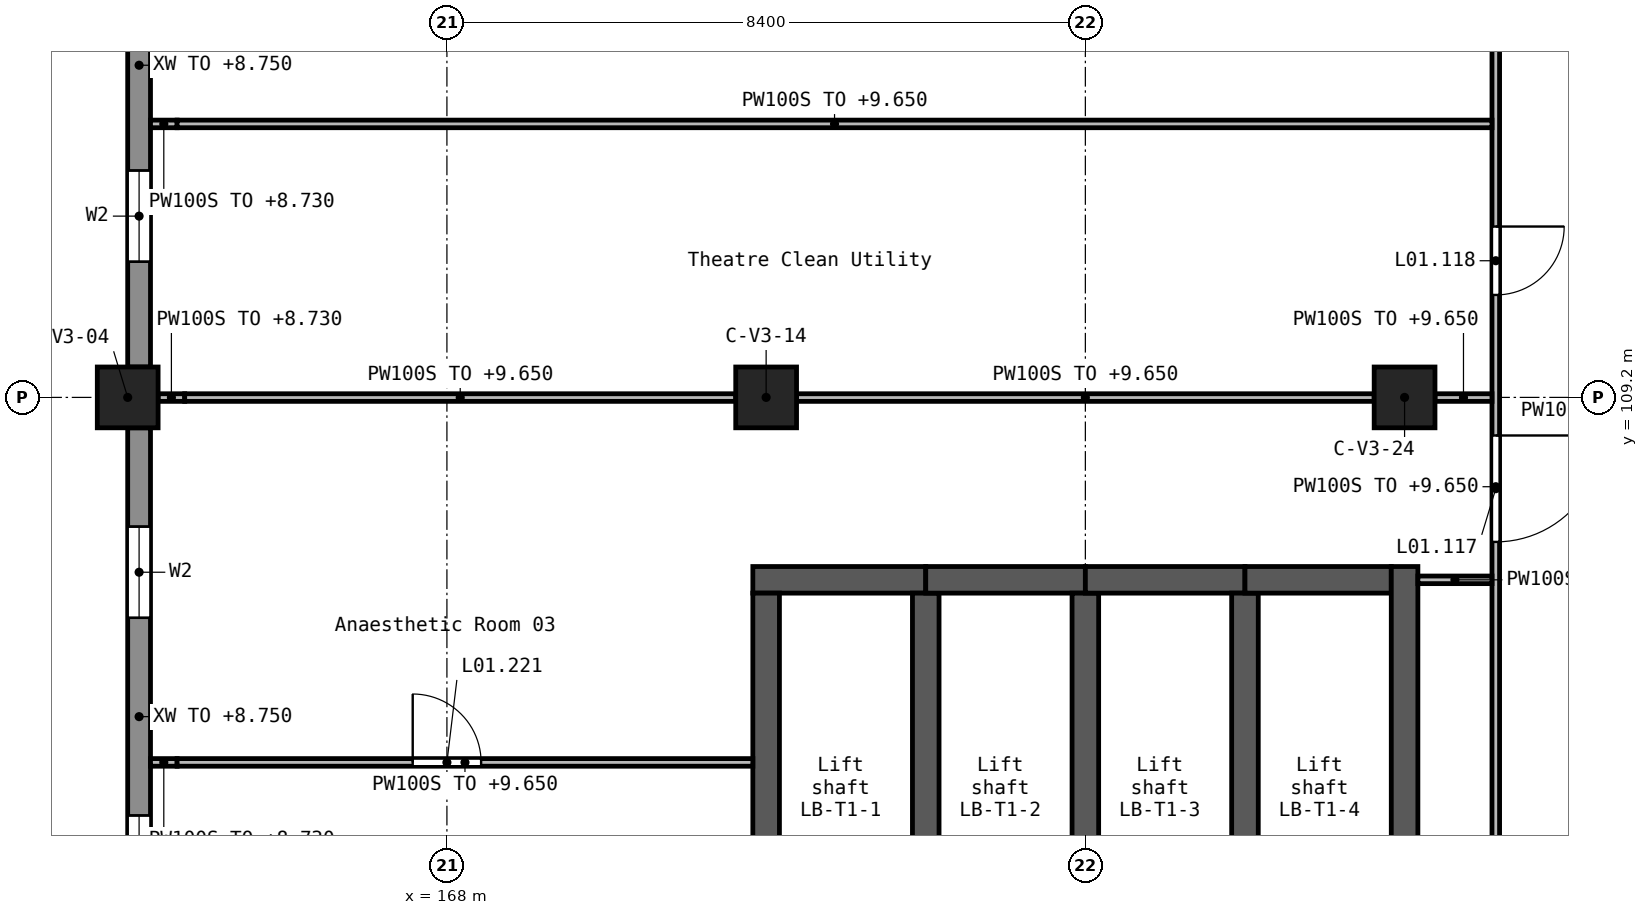
"""IFC4 building model, lengths in metres.
Left out: names, types, materials, properties, quantities, classifications, styles, units other than length and angle.
Written with IfcOpenShell. Run it as: python <this file> out.ifc"""

import sys

from ifc_helpers import new_model, si_unit, direction, frame, frame_2d, origin, origin_2d, place, context, subcontext, project, spatial, rectangle, extrude, element, fill, save


model = new_model("IFC4")
c1 = context("Model", 3, precision=1e-05, world=origin(), true_north=direction((0.0, 1.0)))
c2 = subcontext(c1, "Body", "Model", "MODEL_VIEW")
j1 = project(units=[si_unit("LENGTHUNIT", "METRE"), si_unit("PLANEANGLEUNIT", "RADIAN")], contexts=[c1])
p1 = place(None, origin())
s1 = spatial("IfcSite", under=j1, at=p1, CompositionType="ELEMENT")
p2 = place(p1, origin())
s2 = spatial("IfcBuilding", under=s1, at=p2, CompositionType="ELEMENT")
p3 = place(p2, frame((0.0, 0.0, 5.4)))
s3 = spatial("IfcBuildingStorey", under=s2, at=p3, CompositionType="ELEMENT", Elevation=5.4)
for number, where, z_axis, x_axis in (
    (1, (163.8, 109.2, 0.0), (0.0, 0.0, 1.0), (1.0, 0.0, 0.0)),
    (2, (172.2, 109.2, 0.0), (0.0, 0.0, 1.0), (1.0, 0.0, 0.0)),
    (3, (180.6, 109.2, 0.0), (0.0, 0.0, 1.0), (1.0, 0.0, 0.0)),
):
    element("IfcColumn", number, at=place(p3, frame(where, z_axis=z_axis, x_axis=x_axis)), inside=s3, PredefinedType="COLUMN", context=c2, shape_type="SweptSolid", body=[
        extrude(rectangle(XDim=0.8, YDim=0.8, at=origin_2d()), origin(), (0.0, 0.0, 1.0), 4.5),
    ])
p4 = place(p3, frame((172.025, 106.8, 0.0), z_axis=(0.0, 0.0, 1.0), x_axis=(1.0, 0.0, 0.0)))
e4 = element("IfcWall", 4, at=p4, inside=s3, PredefinedType="SHEAR", context=c2, shape_type="SweptSolid", body=[
    extrude(rectangle(XDim=2.275, YDim=0.35, at=frame_2d((1.138, 0.0))), origin(), (0.0, 0.0, 1.0), 4.5),
])
p5 = place(p3, frame((172.2, 101.225, 0.0), z_axis=(0.0, 0.0, 1.0), x_axis=(0.0, 1.0, 0.0)))
e5 = element("IfcWall", 5, at=p5, inside=s3, PredefinedType="SHEAR", context=c2, shape_type="SweptSolid", body=[
    extrude(rectangle(XDim=5.4, YDim=0.35, at=frame_2d((2.7, 0.0))), origin(), (0.0, 0.0, 1.0), 4.5),
])
p6 = place(p3, frame((174.3, 101.575, 0.0), z_axis=(0.0, 0.0, 1.0), x_axis=(0.0, 1.0, 0.0)))
e6 = element("IfcWall", 6, at=p6, inside=s3, PredefinedType="SHEAR", context=c2, shape_type="SweptSolid", body=[
    extrude(rectangle(XDim=5.05, YDim=0.35, at=frame_2d((2.525, 0.0))), origin(), (0.0, 0.0, 1.0), 4.5),
])
p7 = place(p3, frame((174.3, 106.8, 0.0), z_axis=(0.0, 0.0, 1.0), x_axis=(1.0, 0.0, 0.0)))
e7 = element("IfcWall", 7, at=p7, inside=s3, PredefinedType="SHEAR", context=c2, shape_type="SweptSolid", body=[
    extrude(rectangle(XDim=2.1, YDim=0.35, at=frame_2d((1.05, 0.0))), origin(), (0.0, 0.0, 1.0), 4.5),
])
p8 = place(p3, frame((176.4, 101.575, 0.0), z_axis=(0.0, 0.0, 1.0), x_axis=(0.0, 1.0, 0.0)))
e8 = element("IfcWall", 8, at=p8, inside=s3, PredefinedType="SHEAR", context=c2, shape_type="SweptSolid", body=[
    extrude(rectangle(XDim=5.05, YDim=0.35, at=frame_2d((2.525, 0.0))), origin(), (0.0, 0.0, 1.0), 4.5),
])
p9 = place(p3, frame((176.4, 106.8, 0.0), z_axis=(0.0, 0.0, 1.0), x_axis=(1.0, 0.0, 0.0)))
e9 = element("IfcWall", 9, at=p9, inside=s3, PredefinedType="SHEAR", context=c2, shape_type="SweptSolid", body=[
    extrude(rectangle(XDim=2.1, YDim=0.35, at=frame_2d((1.05, 0.0))), origin(), (0.0, 0.0, 1.0), 4.5),
])
p10 = place(p3, frame((178.5, 101.575, 0.0), z_axis=(0.0, 0.0, 1.0), x_axis=(0.0, 1.0, 0.0)))
e10 = element("IfcWall", 10, at=p10, inside=s3, PredefinedType="SHEAR", context=c2, shape_type="SweptSolid", body=[
    extrude(rectangle(XDim=5.05, YDim=0.35, at=frame_2d((2.525, 0.0))), origin(), (0.0, 0.0, 1.0), 4.5),
])
p11 = place(p3, frame((178.5, 106.8, 0.0), z_axis=(0.0, 0.0, 1.0), x_axis=(1.0, 0.0, 0.0)))
e11 = element("IfcWall", 11, at=p11, inside=s3, PredefinedType="SHEAR", context=c2, shape_type="SweptSolid", body=[
    extrude(rectangle(XDim=1.925, YDim=0.35, at=frame_2d((0.962, 0.0))), origin(), (0.0, 0.0, 1.0), 4.5),
])
p12 = place(p3, frame((180.6, 101.225, 0.0), z_axis=(0.0, 0.0, 1.0), x_axis=(0.0, 1.0, 0.0)))
e12 = element("IfcWall", 12, at=p12, inside=s3, PredefinedType="SHEAR", context=c2, shape_type="SweptSolid", body=[
    extrude(rectangle(XDim=5.75, YDim=0.35, at=frame_2d((2.875, 0.0))), origin(), (0.0, 0.0, 1.0), 4.5),
])
p13 = place(p3, frame((163.95, 117.54, 0.0), z_axis=(0.0, 0.0, 1.0), x_axis=(0.0, -1.0, 0.0)))
e13 = element("IfcWall", 13, at=p13, inside=s3, PredefinedType="STANDARD", context=c2, shape_type="SweptSolid", body=[
    extrude(rectangle(XDim=7.94, YDim=0.3, at=frame_2d((3.97, 0.0))), origin(), (0.0, 0.0, 1.0), 3.35),
])
p14 = place(p13, frame((1.385, 0.0, 1.2)))
e14 = element("IfcOpeningElement", 14, at=p14, cuts=e13, PredefinedType="OPENING", context=c2, shape_type="SweptSolid", body=[
    extrude(rectangle(XDim=1.2, YDim=1.2, at=frame_2d((0.6, 0.6))), frame((0.0, 0.16, 0.0), z_axis=(0.0, -1.0, 0.0), x_axis=(1.0, 0.0, 0.0)), (0.0, 0.0, 1.0), 0.32),
])
p15 = place(p13, frame((5.355, 0.0, 1.2)))
e15 = element("IfcOpeningElement", 15, at=p15, cuts=e13, PredefinedType="OPENING", context=c2, shape_type="SweptSolid", body=[
    extrude(rectangle(XDim=1.2, YDim=1.2, at=frame_2d((0.6, 0.6))), frame((0.0, 0.16, 0.0), z_axis=(0.0, -1.0, 0.0), x_axis=(1.0, 0.0, 0.0)), (0.0, 0.0, 1.0), 0.32),
])
p16 = place(p3, frame((163.95, 108.8, 0.0), z_axis=(0.0, 0.0, 1.0), x_axis=(0.0, -1.0, 0.0)))
e16 = element("IfcWall", 16, at=p16, inside=s3, PredefinedType="STANDARD", context=c2, shape_type="SweptSolid", body=[
    extrude(rectangle(XDim=7.6, YDim=0.3, at=frame_2d((3.8, 0.0))), origin(), (0.0, 0.0, 1.0), 3.35),
])
p17 = place(p16, frame((1.3, 0.0, 1.2)))
e17 = element("IfcOpeningElement", 17, at=p17, cuts=e16, PredefinedType="OPENING", context=c2, shape_type="SweptSolid", body=[
    extrude(rectangle(XDim=1.2, YDim=1.2, at=frame_2d((0.6, 0.6))), frame((0.0, 0.16, 0.0), z_axis=(0.0, -1.0, 0.0), x_axis=(1.0, 0.0, 0.0)), (0.0, 0.0, 1.0), 0.32),
])
p18 = place(p16, frame((5.1, 0.0, 1.2)))
e18 = element("IfcOpeningElement", 18, at=p18, cuts=e16, PredefinedType="OPENING", context=c2, shape_type="SweptSolid", body=[
    extrude(rectangle(XDim=1.2, YDim=1.2, at=frame_2d((0.6, 0.6))), frame((0.0, 0.16, 0.0), z_axis=(0.0, -1.0, 0.0), x_axis=(1.0, 0.0, 0.0)), (0.0, 0.0, 1.0), 0.32),
])
p19 = place(p3, frame((181.8, 117.1, 0.0), z_axis=(0.0, 0.0, 1.0), x_axis=(0.0, -1.0, 0.0)))
e19 = element("IfcWall", 19, at=p19, inside=s3, PredefinedType="PARTITIONING", context=c2, shape_type="SweptSolid", body=[
    extrude(rectangle(XDim=18.15, YDim=0.1, at=frame_2d((9.075, 0.0))), origin(), (0.0, 0.0, 1.0), 4.25),
])
p20 = place(p19, frame((8.401, 0.0, 0.0)))
e20 = element("IfcOpeningElement", 20, at=p20, cuts=e19, PredefinedType="OPENING", context=c2, shape_type="SweptSolid", body=[
    extrude(rectangle(XDim=1.4, YDim=2.1, at=frame_2d((0.7, 1.05))), frame((0.0, 0.06, 0.0), z_axis=(0.0, -1.0, 0.0), x_axis=(1.0, 0.0, 0.0)), (0.0, 0.0, 1.0), 0.12),
])
p21 = place(p19, frame((5.652, 0.0, 0.0)))
e21 = element("IfcOpeningElement", 21, at=p21, cuts=e19, PredefinedType="OPENING", context=c2, shape_type="SweptSolid", body=[
    extrude(rectangle(XDim=0.9, YDim=2.1, at=frame_2d((0.45, 1.05))), frame((0.0, 0.06, 0.0), z_axis=(0.0, -1.0, 0.0), x_axis=(1.0, 0.0, 0.0)), (0.0, 0.0, 1.0), 0.12),
])
p22 = place(p19, frame((1.201, 0.0, 0.0)))
e22 = element("IfcOpeningElement", 22, at=p22, cuts=e19, PredefinedType="OPENING", context=c2, shape_type="SweptSolid", body=[
    extrude(rectangle(XDim=1.4, YDim=2.1, at=frame_2d((0.7, 1.05))), frame((0.0, 0.06, 0.0), z_axis=(0.0, -1.0, 0.0), x_axis=(1.0, 0.0, 0.0)), (0.0, 0.0, 1.0), 0.12),
])
p23 = place(p3, frame((164.2, 109.198, 0.0), z_axis=(0.0, 0.0, 1.0), x_axis=(1.0, 0.0, 0.0)))
e23 = element("IfcWall", 23, at=p23, inside=s3, PredefinedType="PARTITIONING", context=c2, shape_type="SweptSolid", body=[
    extrude(rectangle(XDim=0.35, YDim=0.1, at=frame_2d((0.175, 0.0))), origin(), (0.0, 0.0, 1.0), 3.33),
])
p24 = place(p3, frame((164.55, 109.198, 0.0), z_axis=(0.0, 0.0, 1.0), x_axis=(1.0, 0.0, 0.0)))
e24 = element("IfcWall", 24, at=p24, inside=s3, PredefinedType="PARTITIONING", context=c2, shape_type="SweptSolid", body=[
    extrude(rectangle(XDim=7.25, YDim=0.1, at=frame_2d((3.625, 0.0))), origin(), (0.0, 0.0, 1.0), 4.25),
])
p25 = place(p3, frame((172.6, 109.198, 0.0), z_axis=(0.0, 0.0, 1.0), x_axis=(1.0, 0.0, 0.0)))
e25 = element("IfcWall", 25, at=p25, inside=s3, PredefinedType="PARTITIONING", context=c2, shape_type="SweptSolid", body=[
    extrude(rectangle(XDim=7.6, YDim=0.1, at=frame_2d((3.8, 0.0))), origin(), (0.0, 0.0, 1.0), 4.25),
])
p26 = place(p3, frame((181.0, 109.198, 0.0), z_axis=(0.0, 0.0, 1.0), x_axis=(1.0, 0.0, 0.0)))
e26 = element("IfcWall", 26, at=p26, inside=s3, PredefinedType="PARTITIONING", context=c2, shape_type="SweptSolid", body=[
    extrude(rectangle(XDim=0.75, YDim=0.1, at=frame_2d((0.375, 0.0))), origin(), (0.0, 0.0, 1.0), 4.25),
])
p27 = place(p3, frame((164.1, 112.798, 0.0), z_axis=(0.0, 0.0, 1.0), x_axis=(1.0, 0.0, 0.0)))
e27 = element("IfcWall", 27, at=p27, inside=s3, PredefinedType="PARTITIONING", context=c2, shape_type="SweptSolid", body=[
    extrude(rectangle(XDim=0.35, YDim=0.1, at=frame_2d((0.175, 0.0))), origin(), (0.0, 0.0, 1.0), 3.33),
])
p28 = place(p3, frame((164.45, 112.798, 0.0), z_axis=(0.0, 0.0, 1.0), x_axis=(1.0, 0.0, 0.0)))
e28 = element("IfcWall", 28, at=p28, inside=s3, PredefinedType="PARTITIONING", context=c2, shape_type="SweptSolid", body=[
    extrude(rectangle(XDim=17.3, YDim=0.1, at=frame_2d((8.65, 0.0))), origin(), (0.0, 0.0, 1.0), 4.25),
])
p29 = place(p3, frame((180.775, 106.8, 0.0), z_axis=(0.0, 0.0, 1.0), x_axis=(1.0, 0.0, 0.0)))
e29 = element("IfcWall", 29, at=p29, inside=s3, PredefinedType="PARTITIONING", context=c2, shape_type="SweptSolid", body=[
    extrude(rectangle(XDim=0.975, YDim=0.1, at=frame_2d((0.488, 0.0))), origin(), (0.0, 0.0, 1.0), 4.25),
])
p30 = place(p3, frame((164.1, 104.398, 0.0), z_axis=(0.0, 0.0, 1.0), x_axis=(1.0, 0.0, 0.0)))
e30 = element("IfcWall", 30, at=p30, inside=s3, PredefinedType="PARTITIONING", context=c2, shape_type="SweptSolid", body=[
    extrude(rectangle(XDim=0.35, YDim=0.1, at=frame_2d((0.175, 0.0))), origin(), (0.0, 0.0, 1.0), 3.33),
])
p31 = place(p3, frame((164.45, 104.398, 0.0), z_axis=(0.0, 0.0, 1.0), x_axis=(1.0, 0.0, 0.0)))
e31 = element("IfcWall", 31, at=p31, inside=s3, PredefinedType="PARTITIONING", context=c2, shape_type="SweptSolid", body=[
    extrude(rectangle(XDim=7.575, YDim=0.1, at=frame_2d((3.788, 0.0))), origin(), (0.0, 0.0, 1.0), 4.25),
])
p32 = place(p31, frame((3.1, 0.0, 0.0)))
e32 = element("IfcOpeningElement", 32, at=p32, cuts=e31, PredefinedType="OPENING", context=c2, shape_type="SweptSolid", body=[
    extrude(rectangle(XDim=0.9, YDim=2.1, at=frame_2d((0.45, 1.05))), frame((0.0, 0.06, 0.0), z_axis=(0.0, -1.0, 0.0), x_axis=(1.0, 0.0, 0.0)), (0.0, 0.0, 1.0), 0.12),
])
p33 = place(p15, origin())
e33 = element("IfcWindow", 33, at=p33, inside=s3, PartitioningType="SINGLE_PANEL", PredefinedType="WINDOW", context=c2, shape_type="SweptSolid", body=[
    extrude(rectangle(XDim=1.2, YDim=1.2, at=frame_2d((0.6, 0.6))), frame((0.0, 0.03, 0.0), z_axis=(0.0, -1.0, 0.0), x_axis=(1.0, 0.0, 0.0)), (0.0, 0.0, 1.0), 0.06),
])
fill(e15, e33)
p34 = place(p17, origin())
e34 = element("IfcWindow", 34, at=p34, inside=s3, PartitioningType="SINGLE_PANEL", PredefinedType="WINDOW", context=c2, shape_type="SweptSolid", body=[
    extrude(rectangle(XDim=1.2, YDim=1.2, at=frame_2d((0.6, 0.6))), frame((0.0, 0.03, 0.0), z_axis=(0.0, -1.0, 0.0), x_axis=(1.0, 0.0, 0.0)), (0.0, 0.0, 1.0), 0.06),
])
fill(e17, e34)
p35 = place(p18, origin())
e35 = element("IfcWindow", 35, at=p35, inside=s3, PartitioningType="SINGLE_PANEL", PredefinedType="WINDOW", context=c2, shape_type="SweptSolid", body=[
    extrude(rectangle(XDim=1.2, YDim=1.2, at=frame_2d((0.6, 0.6))), frame((0.0, 0.03, 0.0), z_axis=(0.0, -1.0, 0.0), x_axis=(1.0, 0.0, 0.0)), (0.0, 0.0, 1.0), 0.06),
])
fill(e18, e35)
p36 = place(p20, frame((1.4, 0.0, 0.0), z_axis=(0.0, 0.0, 1.0), x_axis=(-1.0, 0.0, 0.0)))
e36 = element("IfcDoor", 36, at=p36, inside=s3, OperationType="DOUBLE_DOOR_SINGLE_SWING", PredefinedType="DOOR", context=c2, shape_type="SweptSolid", body=[
    extrude(rectangle(XDim=1.4, YDim=2.1, at=frame_2d((0.7, 1.05))), frame((0.0, 0.025, 0.0), z_axis=(0.0, -1.0, 0.0), x_axis=(1.0, 0.0, 0.0)), (0.0, 0.0, 1.0), 0.05),
])
fill(e20, e36)
p37 = place(p21, frame((0.9, 0.0, 0.0), z_axis=(0.0, 0.0, 1.0), x_axis=(-1.0, 0.0, 0.0)))
e37 = element("IfcDoor", 37, at=p37, inside=s3, OperationType="SINGLE_SWING_RIGHT", PredefinedType="DOOR", context=c2, shape_type="SweptSolid", body=[
    extrude(rectangle(XDim=0.9, YDim=2.1, at=frame_2d((0.45, 1.05))), frame((0.0, 0.025, 0.0), z_axis=(0.0, -1.0, 0.0), x_axis=(1.0, 0.0, 0.0)), (0.0, 0.0, 1.0), 0.05),
])
fill(e21, e37)
p38 = place(p32, frame((0.9, 0.0, 0.0), z_axis=(0.0, 0.0, 1.0), x_axis=(-1.0, 0.0, 0.0)))
e38 = element("IfcDoor", 38, at=p38, inside=s3, OperationType="SINGLE_SWING_RIGHT", PredefinedType="DOOR", context=c2, shape_type="SweptSolid", body=[
    extrude(rectangle(XDim=0.9, YDim=2.1, at=frame_2d((0.45, 1.05))), frame((0.0, 0.025, 0.0), z_axis=(0.0, -1.0, 0.0), x_axis=(1.0, 0.0, 0.0)), (0.0, 0.0, 1.0), 0.05),
])
fill(e32, e38)
save(model, sys.argv[1])
